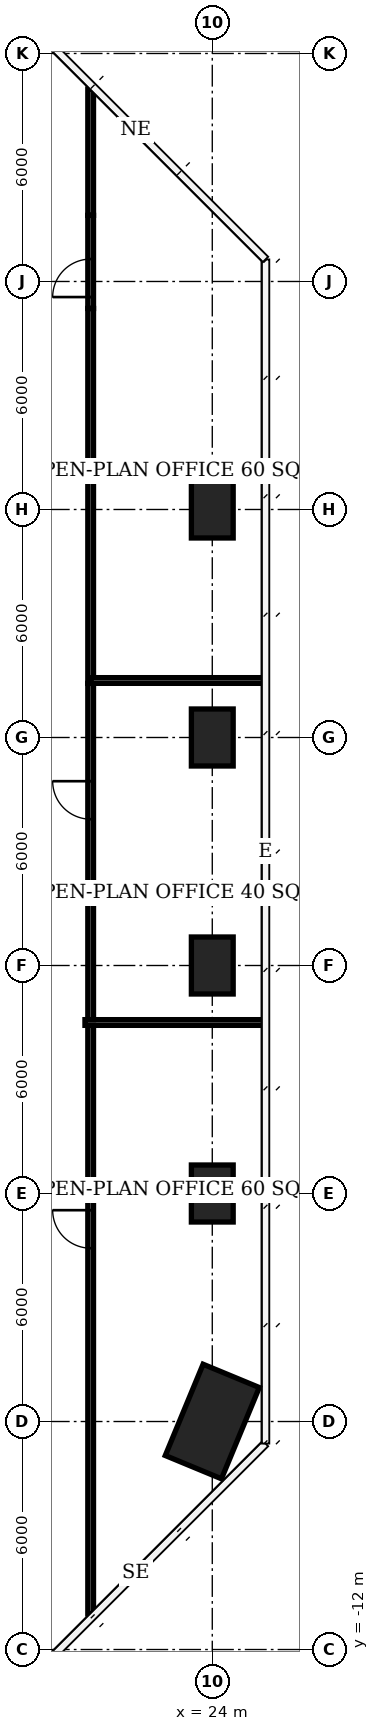
"""IFC4 building model, lengths in metres.
Left out: names, types, materials, properties, quantities, classifications, styles, units other than length and angle.
Written with IfcOpenShell. Run it as: python <this file> out.ifc"""

import sys

from ifc_helpers import new_model, si_unit, direction, frame, frame_2d, origin, origin_2d, place, context, subcontext, project, spatial, rectangle, extrude, element, fill, save


model = new_model("IFC4")
c1 = context("Model", 3, precision=1e-05, world=origin(), true_north=direction((0.0, 1.0)))
c2 = subcontext(c1, "Body", "Model", "MODEL_VIEW")
j1 = project(units=[si_unit("LENGTHUNIT", "METRE"), si_unit("PLANEANGLEUNIT", "RADIAN")], contexts=[c1])
p1 = place(None, origin())
s1 = spatial("IfcSite", under=j1, at=p1, CompositionType="ELEMENT")
p2 = place(p1, origin())
s2 = spatial("IfcBuilding", under=s1, at=p2, CompositionType="ELEMENT")
p3 = place(p2, frame((0.0, 0.0, 192.8)))
s3 = spatial("IfcBuildingStorey", under=s2, at=p3, CompositionType="ELEMENT", Elevation=192.8)
p4 = place(p3, frame((24.0, -6.0, 0.0), z_axis=(0.0, 0.0, 1.0), x_axis=(-0.382683432365, -0.923879532511, 0.0)))
e1 = element("IfcColumn", 1, at=p4, inside=s3, PredefinedType="COLUMN", context=c2, shape_type="SweptSolid", body=[
    extrude(rectangle(XDim=2.6, YDim=1.6, at=origin_2d()), origin(), (0.0, 0.0, 1.0), 3.9),
])
for number, where, z_axis, x_axis in (
    (2, (24.0, 0.0, 0.0), (0.0, 0.0, 1.0), (0.0, 1.0, 0.0)),
    (3, (24.0, 6.0, 0.0), (0.0, 0.0, 1.0), (0.0, 1.0, 0.0)),
    (4, (24.0, 12.0, 0.0), (0.0, 0.0, 1.0), (0.0, 1.0, 0.0)),
    (5, (24.0, 18.0, 0.0), (0.0, 0.0, 1.0), (0.0, 1.0, 0.0)),
):
    element("IfcColumn", number, at=place(p3, frame(where, z_axis=z_axis, x_axis=x_axis)), inside=s3, PredefinedType="COLUMN", context=c2, shape_type="SweptSolid", body=[
        extrude(rectangle(XDim=1.5, YDim=1.1, at=origin_2d()), origin(), (0.0, 0.0, 1.0), 3.9),
    ])
p5 = place(p3, frame((20.8, -11.064, 0.0), z_axis=(0.0, 0.0, 1.0), x_axis=(0.0, 1.0, 0.0)))
e6 = element("IfcWall", 6, at=p5, inside=s3, PredefinedType="PARTITIONING", context=c2, shape_type="SweptSolid", body=[
    extrude(rectangle(XDim=15.489, YDim=0.15, at=frame_2d((7.745, 0.0))), origin(), (0.0, 0.0, 1.0), 3.65),
])
p6 = place(p5, frame((9.625, 0.0, 0.0)))
e7 = element("IfcOpeningElement", 7, at=p6, cuts=e6, PredefinedType="OPENING", context=c2, shape_type="SweptSolid", body=[
    extrude(rectangle(XDim=1.0, YDim=2.1, at=frame_2d((0.5, 1.05))), frame((0.0, 0.085, 0.0), z_axis=(0.0, -1.0, 0.0), x_axis=(1.0, 0.0, 0.0)), (0.0, 0.0, 1.0), 0.17),
])
p7 = place(p3, frame((20.8, 4.575, 0.0), z_axis=(0.0, 0.0, 1.0), x_axis=(0.0, 1.0, 0.0)))
e8 = element("IfcWall", 8, at=p7, inside=s3, PredefinedType="PARTITIONING", context=c2, shape_type="SweptSolid", body=[
    extrude(rectangle(XDim=8.85, YDim=0.15, at=frame_2d((4.425, 0.0))), origin(), (0.0, 0.0, 1.0), 3.65),
])
p8 = place(p7, frame((5.275, 0.0, 0.0)))
e9 = element("IfcOpeningElement", 9, at=p8, cuts=e8, PredefinedType="OPENING", context=c2, shape_type="SweptSolid", body=[
    extrude(rectangle(XDim=1.0, YDim=2.1, at=frame_2d((0.5, 1.05))), frame((0.0, 0.085, 0.0), z_axis=(0.0, -1.0, 0.0), x_axis=(1.0, 0.0, 0.0)), (0.0, 0.0, 1.0), 0.17),
])
p9 = place(p3, frame((20.65, 4.5, 0.0), z_axis=(0.0, 0.0, 1.0), x_axis=(1.0, 0.0, 0.0)))
e10 = element("IfcWall", 10, at=p9, inside=s3, PredefinedType="PARTITIONING", context=c2, shape_type="SweptSolid", body=[
    extrude(rectangle(XDim=4.75, YDim=0.15, at=frame_2d((2.375, 0.0))), origin(), (0.0, 0.0, 1.0), 3.65),
])
p10 = place(p3, frame((20.8, 13.425, 0.0), z_axis=(0.0, 0.0, 1.0), x_axis=(0.0, 1.0, 0.0)))
e11 = element("IfcWall", 11, at=p10, inside=s3, PredefinedType="PARTITIONING", context=c2, shape_type="SweptSolid", body=[
    extrude(rectangle(XDim=9.865, YDim=0.15, at=frame_2d((4.933, 0.0))), origin(), (0.0, 0.0, 1.0), 3.65),
])
p11 = place(p3, frame((20.8, 23.29, 0.0), z_axis=(0.0, 0.0, 1.0), x_axis=(0.0, 1.0, 0.0)))
e12 = element("IfcWall", 12, at=p11, inside=s3, PredefinedType="PARTITIONING", context=c2, shape_type="SweptSolid", body=[
    extrude(rectangle(XDim=2.45, YDim=0.15, at=frame_2d((1.225, 0.0))), origin(), (0.0, 0.0, 1.0), 2.65),
])
p12 = place(p11, frame((0.3, 0.0, 0.0)))
e13 = element("IfcOpeningElement", 13, at=p12, cuts=e12, PredefinedType="OPENING", context=c2, shape_type="SweptSolid", body=[
    extrude(rectangle(XDim=1.0, YDim=2.1, at=frame_2d((0.5, 1.05))), frame((0.0, 0.085, 0.0), z_axis=(0.0, -1.0, 0.0), x_axis=(1.0, 0.0, 0.0)), (0.0, 0.0, 1.0), 0.17),
])
p13 = place(p3, frame((20.8, 25.74, 0.0), z_axis=(0.0, 0.0, 1.0), x_axis=(0.0, 1.0, 0.0)))
e14 = element("IfcWall", 14, at=p13, inside=s3, PredefinedType="PARTITIONING", context=c2, shape_type="SweptSolid", body=[
    extrude(rectangle(XDim=3.324, YDim=0.15, at=frame_2d((1.662, 0.0))), origin(), (0.0, 0.0, 1.0), 3.65),
])
p14 = place(p3, frame((20.8, 13.5, 0.0), z_axis=(0.0, 0.0, 1.0), x_axis=(1.0, 0.0, 0.0)))
e15 = element("IfcWall", 15, at=p14, inside=s3, PredefinedType="PARTITIONING", context=c2, shape_type="SweptSolid", body=[
    extrude(rectangle(XDim=4.6, YDim=0.15, at=frame_2d((2.3, 0.0))), origin(), (0.0, 0.0, 1.0), 3.65),
])
p15 = place(p6, origin())
e16 = element("IfcDoor", 16, at=p15, inside=s3, OperationType="SINGLE_SWING_RIGHT", PredefinedType="DOOR", context=c2, shape_type="SweptSolid", body=[
    extrude(rectangle(XDim=1.0, YDim=2.1, at=frame_2d((0.5, 1.05))), frame((0.0, 0.025, 0.0), z_axis=(0.0, -1.0, 0.0), x_axis=(1.0, 0.0, 0.0)), (0.0, 0.0, 1.0), 0.05),
])
fill(e7, e16)
p16 = place(p8, origin())
e17 = element("IfcDoor", 17, at=p16, inside=s3, OperationType="SINGLE_SWING_RIGHT", PredefinedType="DOOR", context=c2, shape_type="SweptSolid", body=[
    extrude(rectangle(XDim=1.0, YDim=2.1, at=frame_2d((0.5, 1.05))), frame((0.0, 0.025, 0.0), z_axis=(0.0, -1.0, 0.0), x_axis=(1.0, 0.0, 0.0)), (0.0, 0.0, 1.0), 0.05),
])
fill(e9, e17)
p17 = place(p12, origin())
e18 = element("IfcDoor", 18, at=p17, inside=s3, OperationType="SINGLE_SWING_LEFT", PredefinedType="DOOR", context=c2, shape_type="SweptSolid", body=[
    extrude(rectangle(XDim=1.0, YDim=2.1, at=frame_2d((0.5, 1.05))), frame((0.0, 0.025, 0.0), z_axis=(0.0, -1.0, 0.0), x_axis=(1.0, 0.0, 0.0)), (0.0, 0.0, 1.0), 0.05),
])
fill(e13, e18)
save(model, sys.argv[1])
